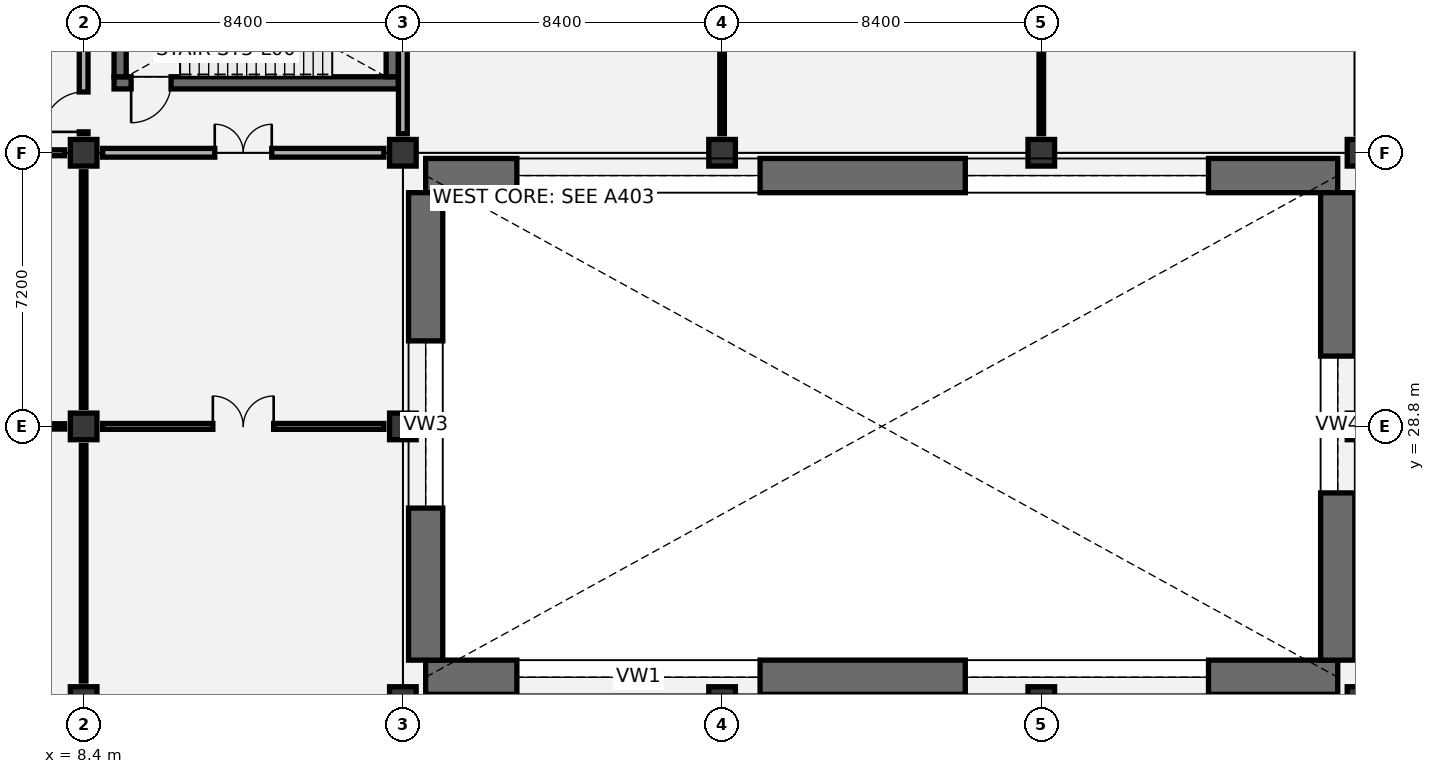
"""IFC4 building model, lengths in metres.
Left out: names, types, materials, properties, quantities, classifications, styles, units other than length and angle.
Written with IfcOpenShell. Run it as: python <this file> out.ifc"""

import sys

from ifc_helpers import new_model, si_unit, direction, frame, frame_2d, origin, origin_2d, place, context, subcontext, project, spatial, rectangle, extrude, element, fill, save


model = new_model("IFC4")
c1 = context("Model", 3, precision=1e-05, world=origin(), true_north=direction((0.0, 1.0)))
c2 = subcontext(c1, "Body", "Model", "MODEL_VIEW")
j1 = project(units=[si_unit("LENGTHUNIT", "METRE"), si_unit("PLANEANGLEUNIT", "RADIAN")], contexts=[c1])
p1 = place(None, origin())
s1 = spatial("IfcSite", under=j1, at=p1, CompositionType="ELEMENT")
p2 = place(p1, origin())
s2 = spatial("IfcBuilding", under=s1, at=p2, CompositionType="ELEMENT")
p3 = place(p2, origin())
s3 = spatial("IfcBuildingStorey", under=s2, at=p3, CompositionType="ELEMENT", Elevation=0.0)
for number, where, z_axis, x_axis in (
    (1, (8.4, 21.6, 0.0), (0.0, 0.0, 1.0), (1.0, 0.0, 0.0)),
    (2, (8.4, 28.8, 0.0), (0.0, 0.0, 1.0), (1.0, 0.0, 0.0)),
    (3, (8.4, 36.0, 0.0), (0.0, 0.0, 1.0), (1.0, 0.0, 0.0)),
    (4, (16.8, 21.6, 0.0), (0.0, 0.0, 1.0), (1.0, 0.0, 0.0)),
    (5, (16.8, 28.8, 0.0), (0.0, 0.0, 1.0), (1.0, 0.0, 0.0)),
    (6, (16.8, 36.0, 0.0), (0.0, 0.0, 1.0), (1.0, 0.0, 0.0)),
    (7, (25.2, 21.6, 0.0), (0.0, 0.0, 1.0), (1.0, 0.0, 0.0)),
    (8, (25.2, 36.0, 0.0), (0.0, 0.0, 1.0), (1.0, 0.0, 0.0)),
    (9, (33.6, 21.6, 0.0), (0.0, 0.0, 1.0), (1.0, 0.0, 0.0)),
    (10, (33.6, 36.0, 0.0), (0.0, 0.0, 1.0), (1.0, 0.0, 0.0)),
    (11, (42.0, 21.6, 0.0), (0.0, 0.0, 1.0), (1.0, 0.0, 0.0)),
    (12, (42.0, 28.8, 0.0), (0.0, 0.0, 1.0), (1.0, 0.0, 0.0)),
    (13, (42.0, 36.0, 0.0), (0.0, 0.0, 1.0), (1.0, 0.0, 0.0)),
):
    element("IfcColumn", number, at=place(p3, frame(where, z_axis=z_axis, x_axis=x_axis)), inside=s3, PredefinedType="COLUMN", context=c2, shape_type="SweptSolid", body=[
        extrude(rectangle(XDim=0.7, YDim=0.7, at=origin_2d()), origin(), (0.0, 0.0, 1.0), 6.0),
    ])
p4 = place(p3, frame((17.4, 22.2, 0.0), z_axis=(0.0, 0.0, 1.0), x_axis=(1.0, 0.0, 0.0)))
e14 = element("IfcWall", 14, at=p4, inside=s3, PredefinedType="SOLIDWALL", context=c2, shape_type="SweptSolid", body=[
    extrude(rectangle(XDim=24.0, YDim=0.9, at=frame_2d((12.0, 0.0))), origin(), (0.0, 0.0, 1.0), 6.0),
])
p5 = place(p4, frame((2.4, 0.0, 0.8)))
e15 = element("IfcOpeningElement", 15, at=p5, cuts=e14, PredefinedType="OPENING", context=c2, shape_type="SweptSolid", body=[
    extrude(rectangle(XDim=6.4, YDim=3.2, at=frame_2d((3.2, 1.6))), frame((0.0, 0.46, 0.0), z_axis=(0.0, -1.0, 0.0), x_axis=(1.0, 0.0, 0.0)), (0.0, 0.0, 1.0), 0.92),
])
p6 = place(p4, frame((14.2, 0.0, 0.8)))
e16 = element("IfcOpeningElement", 16, at=p6, cuts=e14, PredefinedType="OPENING", context=c2, shape_type="SweptSolid", body=[
    extrude(rectangle(XDim=6.4, YDim=3.2, at=frame_2d((3.2, 1.6))), frame((0.0, 0.46, 0.0), z_axis=(0.0, -1.0, 0.0), x_axis=(1.0, 0.0, 0.0)), (0.0, 0.0, 1.0), 0.92),
])
p7 = place(p3, frame((17.4, 35.4, 0.0), z_axis=(0.0, 0.0, 1.0), x_axis=(1.0, 0.0, 0.0)))
e17 = element("IfcWall", 17, at=p7, inside=s3, PredefinedType="SOLIDWALL", context=c2, shape_type="SweptSolid", body=[
    extrude(rectangle(XDim=24.0, YDim=0.9, at=frame_2d((12.0, 0.0))), origin(), (0.0, 0.0, 1.0), 6.0),
])
p8 = place(p7, frame((2.4, 0.0, 0.8)))
e18 = element("IfcOpeningElement", 18, at=p8, cuts=e17, PredefinedType="OPENING", context=c2, shape_type="SweptSolid", body=[
    extrude(rectangle(XDim=6.4, YDim=3.2, at=frame_2d((3.2, 1.6))), frame((0.0, 0.46, 0.0), z_axis=(0.0, -1.0, 0.0), x_axis=(1.0, 0.0, 0.0)), (0.0, 0.0, 1.0), 0.92),
])
p9 = place(p7, frame((14.2, 0.0, 0.8)))
e19 = element("IfcOpeningElement", 19, at=p9, cuts=e17, PredefinedType="OPENING", context=c2, shape_type="SweptSolid", body=[
    extrude(rectangle(XDim=6.4, YDim=3.2, at=frame_2d((3.2, 1.6))), frame((0.0, 0.46, 0.0), z_axis=(0.0, -1.0, 0.0), x_axis=(1.0, 0.0, 0.0)), (0.0, 0.0, 1.0), 0.92),
])
p10 = place(p3, frame((17.4, 22.65, 0.0), z_axis=(0.0, 0.0, 1.0), x_axis=(0.0, 1.0, 0.0)))
e20 = element("IfcWall", 20, at=p10, inside=s3, PredefinedType="SOLIDWALL", context=c2, shape_type="SweptSolid", body=[
    extrude(rectangle(XDim=12.3, YDim=0.9, at=frame_2d((6.15, 0.0))), origin(), (0.0, 0.0, 1.0), 6.0),
])
p11 = place(p10, frame((4.0, 0.0, 0.9)))
e21 = element("IfcOpeningElement", 21, at=p11, cuts=e20, PredefinedType="OPENING", context=c2, shape_type="SweptSolid", body=[
    extrude(rectangle(XDim=4.4, YDim=2.8, at=frame_2d((2.2, 1.4))), frame((0.0, 0.46, 0.0), z_axis=(0.0, -1.0, 0.0), x_axis=(1.0, 0.0, 0.0)), (0.0, 0.0, 1.0), 0.92),
])
p12 = place(p3, frame((41.4, 22.65, 0.0), z_axis=(0.0, 0.0, 1.0), x_axis=(0.0, 1.0, 0.0)))
e22 = element("IfcWall", 22, at=p12, inside=s3, PredefinedType="SOLIDWALL", context=c2, shape_type="SweptSolid", body=[
    extrude(rectangle(XDim=12.3, YDim=0.9, at=frame_2d((6.15, 0.0))), origin(), (0.0, 0.0, 1.0), 6.0),
])
p13 = place(p12, frame((4.4, 0.0, 0.9)))
e23 = element("IfcOpeningElement", 23, at=p13, cuts=e22, PredefinedType="OPENING", context=c2, shape_type="SweptSolid", body=[
    extrude(rectangle(XDim=3.6, YDim=2.6, at=frame_2d((1.8, 1.3))), frame((0.0, 0.46, 0.0), z_axis=(0.0, -1.0, 0.0), x_axis=(1.0, 0.0, 0.0)), (0.0, 0.0, 1.0), 0.92),
])
p14 = place(p3, frame((9.2, 37.84, 0.0), z_axis=(0.0, 0.0, 1.0), x_axis=(1.0, 0.0, 0.0)))
e24 = element("IfcWall", 24, at=p14, inside=s3, PredefinedType="SHEAR", context=c2, shape_type="SweptSolid", body=[
    extrude(rectangle(XDim=7.48, YDim=0.32, at=frame_2d((3.74, 0.0))), origin(), (0.0, 0.0, 1.0), 5.675),
])
p15 = place(p14, frame((0.45, 0.0, 0.0)))
e25 = element("IfcOpeningElement", 25, at=p15, cuts=e24, PredefinedType="OPENING", context=c2, shape_type="SweptSolid", body=[
    extrude(rectangle(XDim=1.05, YDim=2.15, at=frame_2d((0.525, 1.075))), frame((0.0, 0.17, 0.0), z_axis=(0.0, -1.0, 0.0), x_axis=(1.0, 0.0, 0.0)), (0.0, 0.0, 1.0), 0.34),
])
for number, where, z_axis, x_axis in (
    (26, (9.36, 38.0, 0.0), (0.0, 0.0, 1.0), (0.0, 1.0, 0.0)),
    (27, (16.52, 38.0, 0.0), (0.0, 0.0, 1.0), (0.0, 1.0, 0.0)),
):
    element("IfcWall", number, at=place(p3, frame(where, z_axis=z_axis, x_axis=x_axis)), inside=s3, PredefinedType="SHEAR", context=c2, shape_type="SweptSolid", body=[
        extrude(rectangle(XDim=3.8, YDim=0.32, at=frame_2d((1.9, 0.0))), origin(), (0.0, 0.0, 1.0), 5.675),
    ])
p16 = place(p3, frame((8.4, 22.1, 0.0), z_axis=(0.0, 0.0, 1.0), x_axis=(0.0, 1.0, 0.0)))
e28 = element("IfcWall", 28, at=p16, inside=s3, PredefinedType="PARTITIONING", context=c2, shape_type="SweptSolid", body=[
    extrude(rectangle(XDim=6.2, YDim=0.12, at=frame_2d((3.1, 0.0))), origin(), (0.0, 0.0, 1.0), 5.17),
])
p17 = place(p3, frame((0.5, 28.8, 0.0), z_axis=(0.0, 0.0, 1.0), x_axis=(1.0, 0.0, 0.0)))
e29 = element("IfcWall", 29, at=p17, inside=s3, PredefinedType="PARTITIONING", context=c2, shape_type="SweptSolid", body=[
    extrude(rectangle(XDim=7.4, YDim=0.14, at=frame_2d((3.7, 0.0))), origin(), (0.0, 0.0, 1.0), 4.87),
])
p18 = place(p17, frame((2.9, 0.0, 0.0)))
e30 = element("IfcOpeningElement", 30, at=p18, cuts=e29, PredefinedType="OPENING", context=c2, shape_type="SweptSolid", body=[
    extrude(rectangle(XDim=1.6, YDim=2.2, at=frame_2d((0.8, 1.1))), frame((0.0, 0.08, 0.0), z_axis=(0.0, -1.0, 0.0), x_axis=(1.0, 0.0, 0.0)), (0.0, 0.0, 1.0), 0.16),
])
p19 = place(p3, frame((8.4, 29.3, 0.0), z_axis=(0.0, 0.0, 1.0), x_axis=(0.0, 1.0, 0.0)))
e31 = element("IfcWall", 31, at=p19, inside=s3, PredefinedType="PARTITIONING", context=c2, shape_type="SweptSolid", body=[
    extrude(rectangle(XDim=6.2, YDim=0.12, at=frame_2d((3.1, 0.0))), origin(), (0.0, 0.0, 1.0), 4.92),
])
p20 = place(p3, frame((0.5, 36.0, 0.0), z_axis=(0.0, 0.0, 1.0), x_axis=(1.0, 0.0, 0.0)))
e32 = element("IfcWall", 32, at=p20, inside=s3, PredefinedType="PARTITIONING", context=c2, shape_type="SweptSolid", body=[
    extrude(rectangle(XDim=7.4, YDim=0.155, at=frame_2d((3.7, 0.0))), origin(), (0.0, 0.0, 1.0), 4.87),
])
p21 = place(p20, frame((2.8, 0.0, 0.0)))
e33 = element("IfcOpeningElement", 33, at=p21, cuts=e32, PredefinedType="OPENING", context=c2, shape_type="SweptSolid", body=[
    extrude(rectangle(XDim=1.8, YDim=2.25, at=frame_2d((0.9, 1.125))), frame((0.0, 0.087, 0.0), z_axis=(0.0, -1.0, 0.0), x_axis=(1.0, 0.0, 0.0)), (0.0, 0.0, 1.0), 0.175),
])
p22 = place(p3, frame((8.4, 36.5, 0.0), z_axis=(0.0, 0.0, 1.0), x_axis=(0.0, 1.0, 0.0)))
e34 = element("IfcWall", 34, at=p22, inside=s3, PredefinedType="PARTITIONING", context=c2, shape_type="SweptSolid", body=[
    extrude(rectangle(XDim=6.2, YDim=0.23, at=frame_2d((3.1, 0.0))), origin(), (0.0, 0.0, 1.0), 5.27),
])
p23 = place(p22, frame((0.05, 0.0, 0.0)))
e35 = element("IfcOpeningElement", 35, at=p23, cuts=e34, PredefinedType="OPENING", context=c2, shape_type="SweptSolid", body=[
    extrude(rectangle(XDim=1.05, YDim=2.15, at=frame_2d((0.525, 1.075))), frame((0.0, 0.125, 0.0), z_axis=(0.0, -1.0, 0.0), x_axis=(1.0, 0.0, 0.0)), (0.0, 0.0, 1.0), 0.25),
])
p24 = place(p3, frame((8.9, 28.8, 0.0), z_axis=(0.0, 0.0, 1.0), x_axis=(1.0, 0.0, 0.0)))
e36 = element("IfcWall", 36, at=p24, inside=s3, PredefinedType="PARTITIONING", context=c2, shape_type="SweptSolid", body=[
    extrude(rectangle(XDim=7.4, YDim=0.155, at=frame_2d((3.7, 0.0))), origin(), (0.0, 0.0, 1.0), 4.87),
])
p25 = place(p24, frame((2.9, 0.0, 0.0)))
e37 = element("IfcOpeningElement", 37, at=p25, cuts=e36, PredefinedType="OPENING", context=c2, shape_type="SweptSolid", body=[
    extrude(rectangle(XDim=1.6, YDim=2.2, at=frame_2d((0.8, 1.1))), frame((0.0, 0.087, 0.0), z_axis=(0.0, -1.0, 0.0), x_axis=(1.0, 0.0, 0.0)), (0.0, 0.0, 1.0), 0.175),
])
p26 = place(p3, frame((8.9, 36.0, 0.0), z_axis=(0.0, 0.0, 1.0), x_axis=(1.0, 0.0, 0.0)))
e38 = element("IfcWall", 38, at=p26, inside=s3, PredefinedType="PARTITIONING", context=c2, shape_type="SweptSolid", body=[
    extrude(rectangle(XDim=7.4, YDim=0.23, at=frame_2d((3.7, 0.0))), origin(), (0.0, 0.0, 1.0), 4.87),
])
p27 = place(p26, frame((2.95, 0.0, 0.0)))
e39 = element("IfcOpeningElement", 39, at=p27, cuts=e38, PredefinedType="OPENING", context=c2, shape_type="SweptSolid", body=[
    extrude(rectangle(XDim=1.5, YDim=2.15, at=frame_2d((0.75, 1.075))), frame((0.0, 0.125, 0.0), z_axis=(0.0, -1.0, 0.0), x_axis=(1.0, 0.0, 0.0)), (0.0, 0.0, 1.0), 0.25),
])
p28 = place(p3, frame((16.8, 36.5, 0.0), z_axis=(0.0, 0.0, 1.0), x_axis=(0.0, 1.0, 0.0)))
e40 = element("IfcWall", 40, at=p28, inside=s3, PredefinedType="PARTITIONING", context=c2, shape_type="SweptSolid", body=[
    extrude(rectangle(XDim=6.2, YDim=0.23, at=frame_2d((3.1, 0.0))), origin(), (0.0, 0.0, 1.0), 4.92),
])
p29 = place(p3, frame((25.2, 36.5, 0.0), z_axis=(0.0, 0.0, 1.0), x_axis=(0.0, 1.0, 0.0)))
e41 = element("IfcWall", 41, at=p29, inside=s3, PredefinedType="PARTITIONING", context=c2, shape_type="SweptSolid", body=[
    extrude(rectangle(XDim=6.2, YDim=0.12, at=frame_2d((3.1, 0.0))), origin(), (0.0, 0.0, 1.0), 5.38),
])
p30 = place(p3, frame((33.6, 36.5, 0.0), z_axis=(0.0, 0.0, 1.0), x_axis=(0.0, 1.0, 0.0)))
e42 = element("IfcWall", 42, at=p30, inside=s3, PredefinedType="PARTITIONING", context=c2, shape_type="SweptSolid", body=[
    extrude(rectangle(XDim=6.2, YDim=0.12, at=frame_2d((3.1, 0.0))), origin(), (0.0, 0.0, 1.0), 4.92),
])
p31 = place(p5, origin())
e43 = element("IfcWindow", 43, at=p31, inside=s3, PartitioningType="SINGLE_PANEL", PredefinedType="WINDOW", context=c2, shape_type="SweptSolid", body=[
    extrude(rectangle(XDim=6.4, YDim=3.2, at=frame_2d((3.2, 1.6))), frame((0.0, 0.175, 0.0), z_axis=(0.0, -1.0, 0.0), x_axis=(1.0, 0.0, 0.0)), (0.0, 0.0, 1.0), 0.35),
])
fill(e15, e43)
p32 = place(p6, origin())
e44 = element("IfcWindow", 44, at=p32, inside=s3, PartitioningType="SINGLE_PANEL", PredefinedType="WINDOW", context=c2, shape_type="SweptSolid", body=[
    extrude(rectangle(XDim=6.4, YDim=3.2, at=frame_2d((3.2, 1.6))), frame((0.0, 0.175, 0.0), z_axis=(0.0, -1.0, 0.0), x_axis=(1.0, 0.0, 0.0)), (0.0, 0.0, 1.0), 0.35),
])
fill(e16, e44)
p33 = place(p8, origin())
e45 = element("IfcWindow", 45, at=p33, inside=s3, PartitioningType="SINGLE_PANEL", PredefinedType="WINDOW", context=c2, shape_type="SweptSolid", body=[
    extrude(rectangle(XDim=6.4, YDim=3.2, at=frame_2d((3.2, 1.6))), frame((0.0, 0.175, 0.0), z_axis=(0.0, -1.0, 0.0), x_axis=(1.0, 0.0, 0.0)), (0.0, 0.0, 1.0), 0.35),
])
fill(e18, e45)
p34 = place(p9, origin())
e46 = element("IfcWindow", 46, at=p34, inside=s3, PartitioningType="SINGLE_PANEL", PredefinedType="WINDOW", context=c2, shape_type="SweptSolid", body=[
    extrude(rectangle(XDim=6.4, YDim=3.2, at=frame_2d((3.2, 1.6))), frame((0.0, 0.175, 0.0), z_axis=(0.0, -1.0, 0.0), x_axis=(1.0, 0.0, 0.0)), (0.0, 0.0, 1.0), 0.35),
])
fill(e19, e46)
p35 = place(p11, origin())
e47 = element("IfcWindow", 47, at=p35, inside=s3, PartitioningType="SINGLE_PANEL", PredefinedType="WINDOW", context=c2, shape_type="SweptSolid", body=[
    extrude(rectangle(XDim=4.4, YDim=2.8, at=frame_2d((2.2, 1.4))), frame((0.0, 0.175, 0.0), z_axis=(0.0, -1.0, 0.0), x_axis=(1.0, 0.0, 0.0)), (0.0, 0.0, 1.0), 0.35),
])
fill(e21, e47)
p36 = place(p13, origin())
e48 = element("IfcWindow", 48, at=p36, inside=s3, PartitioningType="SINGLE_PANEL", PredefinedType="WINDOW", context=c2, shape_type="SweptSolid", body=[
    extrude(rectangle(XDim=3.6, YDim=2.6, at=frame_2d((1.8, 1.3))), frame((0.0, 0.175, 0.0), z_axis=(0.0, -1.0, 0.0), x_axis=(1.0, 0.0, 0.0)), (0.0, 0.0, 1.0), 0.35),
])
fill(e23, e48)
p37 = place(p15, frame((1.05, 0.0, 0.0), z_axis=(0.0, 0.0, 1.0), x_axis=(-1.0, 0.0, 0.0)))
e49 = element("IfcDoor", 49, at=p37, inside=s3, OperationType="SINGLE_SWING_RIGHT", PredefinedType="DOOR", context=c2, shape_type="SweptSolid", body=[
    extrude(rectangle(XDim=1.05, YDim=2.15, at=frame_2d((0.525, 1.075))), frame((0.0, 0.025, 0.0), z_axis=(0.0, -1.0, 0.0), x_axis=(1.0, 0.0, 0.0)), (0.0, 0.0, 1.0), 0.05),
])
fill(e25, e49)
p38 = place(p23, origin())
e50 = element("IfcDoor", 50, at=p38, inside=s3, OperationType="SINGLE_SWING_LEFT", PredefinedType="DOOR", context=c2, shape_type="SweptSolid", body=[
    extrude(rectangle(XDim=1.05, YDim=2.15, at=frame_2d((0.525, 1.075))), frame((0.0, 0.025, 0.0), z_axis=(0.0, -1.0, 0.0), x_axis=(1.0, 0.0, 0.0)), (0.0, 0.0, 1.0), 0.05),
])
fill(e35, e50)
p39 = place(p25, origin())
e51 = element("IfcDoor", 51, at=p39, inside=s3, OperationType="DOUBLE_DOOR_SINGLE_SWING", PredefinedType="DOOR", context=c2, shape_type="SweptSolid", body=[
    extrude(rectangle(XDim=1.6, YDim=2.2, at=frame_2d((0.8, 1.1))), frame((0.0, 0.025, 0.0), z_axis=(0.0, -1.0, 0.0), x_axis=(1.0, 0.0, 0.0)), (0.0, 0.0, 1.0), 0.05),
])
fill(e37, e51)
p40 = place(p27, origin())
e52 = element("IfcDoor", 52, at=p40, inside=s3, OperationType="DOUBLE_DOOR_SINGLE_SWING", PredefinedType="DOOR", context=c2, shape_type="SweptSolid", body=[
    extrude(rectangle(XDim=1.5, YDim=2.15, at=frame_2d((0.75, 1.075))), frame((0.0, 0.025, 0.0), z_axis=(0.0, -1.0, 0.0), x_axis=(1.0, 0.0, 0.0)), (0.0, 0.0, 1.0), 0.05),
])
fill(e39, e52)
save(model, sys.argv[1])
